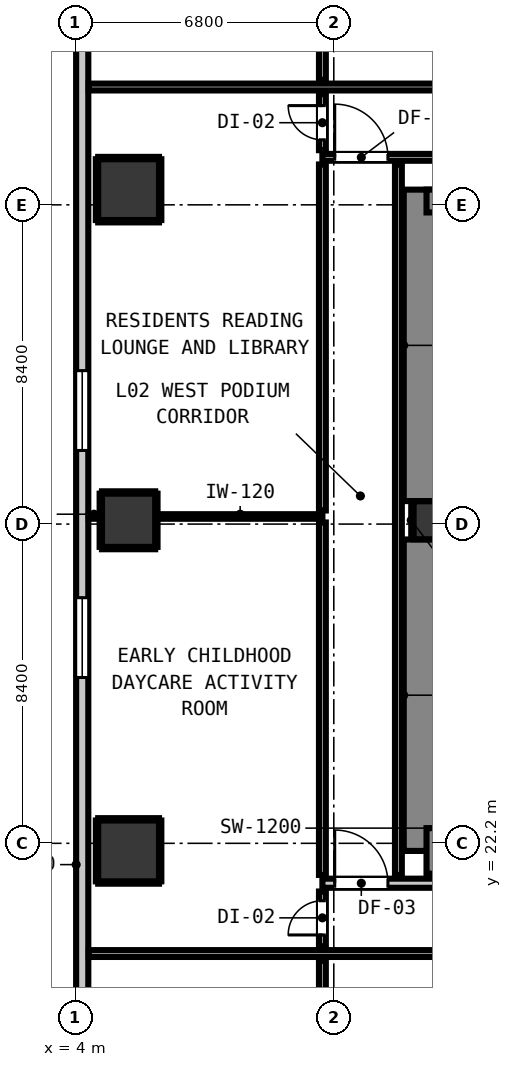
"""IFC4 building model, lengths in metres.
Left out: names, types, materials, properties, quantities, classifications, styles, units other than length and angle.
Written with IfcOpenShell. Run it as: python <this file> out.ifc"""

import sys

from ifc_helpers import new_model, si_unit, direction, frame, frame_2d, origin, origin_2d, place, context, subcontext, project, spatial, rectangle, extrude, element, fill, save


model = new_model("IFC4")
c1 = context("Model", 3, precision=1e-05, world=origin(), true_north=direction((0.0, 1.0)))
c2 = subcontext(c1, "Body", "Model", "MODEL_VIEW")
j1 = project(units=[si_unit("LENGTHUNIT", "METRE"), si_unit("PLANEANGLEUNIT", "RADIAN")], contexts=[c1])
p1 = place(None, origin())
s1 = spatial("IfcSite", under=j1, at=p1, CompositionType="ELEMENT")
p2 = place(p1, origin())
s2 = spatial("IfcBuilding", under=s1, at=p2, CompositionType="ELEMENT")
p3 = place(p2, frame((0.0, 0.0, 9.4)))
s3 = spatial("IfcBuildingStorey", under=s2, at=p3, CompositionType="ELEMENT", Elevation=9.4)
p4 = place(p3, frame((13.4, 30.7, 0.0), z_axis=(0.0, 0.0, 1.0), x_axis=(1.0, 0.0, 0.0)))
e1 = element("IfcColumn", 1, at=p4, inside=s3, PredefinedType="COLUMN", context=c2, shape_type="SweptSolid", body=[
    extrude(rectangle(XDim=1.0, YDim=1.0, at=origin_2d()), origin(), (0.0, 0.0, 1.0), 4.2),
])
p5 = place(p3, frame((13.24, 22.0, 0.0), z_axis=(0.0, 0.0, 1.0), x_axis=(0.0, 1.0, 0.0)))
e2 = element("IfcWall", 2, at=p5, inside=s3, PredefinedType="SHEAR", context=c2, shape_type="SweptSolid", body=[
    extrude(rectangle(XDim=8.195, YDim=1.2, at=frame_2d((4.098, 0.0))), origin(), (0.0, 0.0, 1.0), 4.2),
])
p6 = place(p3, frame((13.24, 31.205, 0.0), z_axis=(0.0, 0.0, 1.0), x_axis=(0.0, 1.0, 0.0)))
e3 = element("IfcWall", 3, at=p6, inside=s3, PredefinedType="SHEAR", context=c2, shape_type="SweptSolid", body=[
    extrude(rectangle(XDim=8.195, YDim=1.2, at=frame_2d((4.097, 0.0))), origin(), (0.0, 0.0, 1.0), 4.2),
])
p7 = place(p3, frame((13.24, 22.0, 0.0), z_axis=(0.0, 0.0, 1.0), x_axis=(1.0, 0.0, 0.0)))
e4 = element("IfcWall", 4, at=p7, inside=s3, PredefinedType="SHEAR", context=c2, shape_type="SweptSolid", body=[
    extrude(rectangle(XDim=4.08, YDim=1.2, at=frame_2d((2.04, 0.0))), origin(), (0.0, 0.0, 1.0), 4.2),
])
p8 = place(p3, frame((13.24, 39.1, 0.0), z_axis=(0.0, 0.0, 1.0), x_axis=(1.0, 0.0, 0.0)))
e5 = element("IfcWall", 5, at=p8, inside=s3, PredefinedType="SHEAR", context=c2, shape_type="SweptSolid", body=[
    extrude(rectangle(XDim=4.08, YDim=0.6, at=frame_2d((2.04, 0.0))), origin(), (0.0, 0.0, 1.0), 4.2),
])
p9 = place(p3, frame((5.4, 22.0, 0.0), z_axis=(0.0, 0.0, 1.0), x_axis=(1.0, 0.0, 0.0)))
e6 = element("IfcColumn", 6, at=p9, inside=s3, PredefinedType="COLUMN", context=c2, shape_type="SweptSolid", body=[
    extrude(rectangle(XDim=1.6, YDim=1.6, at=origin_2d()), origin(), (0.0, 0.0, 1.0), 4.2),
])
p10 = place(p3, frame((5.4, 30.7, 0.0), z_axis=(0.0, 0.0, 1.0), x_axis=(1.0, 0.0, 0.0)))
e7 = element("IfcColumn", 7, at=p10, inside=s3, PredefinedType="COLUMN", context=c2, shape_type="SweptSolid", body=[
    extrude(rectangle(XDim=1.4, YDim=1.4, at=origin_2d()), origin(), (0.0, 0.0, 1.0), 4.2),
])
p11 = place(p3, frame((5.4, 39.4, 0.0), z_axis=(0.0, 0.0, 1.0), x_axis=(1.0, 0.0, 0.0)))
e8 = element("IfcColumn", 8, at=p11, inside=s3, PredefinedType="COLUMN", context=c2, shape_type="SweptSolid", body=[
    extrude(rectangle(XDim=1.6, YDim=1.6, at=origin_2d()), origin(), (0.0, 0.0, 1.0), 4.2),
])
p12 = place(p3, frame((4.18, 12.68, 0.0), z_axis=(0.0, 0.0, 1.0), x_axis=(0.0, 1.0, 0.0)))
e9 = element("IfcWall", 9, at=p12, inside=s3, PredefinedType="STANDARD", context=c2, shape_type="SweptSolid", body=[
    extrude(rectangle(XDim=35.84, YDim=0.32, at=frame_2d((17.92, 0.0))), origin(), (0.0, 0.0, 1.0), 3.92),
])
p13 = place(p12, frame((1.937, 0.0, 0.9)))
e10 = element("IfcOpeningElement", 10, at=p13, cuts=e9, PredefinedType="OPENING", context=c2, shape_type="SweptSolid", body=[
    extrude(rectangle(XDim=2.1, YDim=1.9, at=frame_2d((1.05, 0.95))), frame((0.0, 0.17, 0.0), z_axis=(0.0, -1.0, 0.0), x_axis=(1.0, 0.0, 0.0)), (0.0, 0.0, 1.0), 0.34),
])
p14 = place(p12, frame((13.883, 0.0, 0.9)))
e11 = element("IfcOpeningElement", 11, at=p14, cuts=e9, PredefinedType="OPENING", context=c2, shape_type="SweptSolid", body=[
    extrude(rectangle(XDim=2.1, YDim=1.9, at=frame_2d((1.05, 0.95))), frame((0.0, 0.17, 0.0), z_axis=(0.0, -1.0, 0.0), x_axis=(1.0, 0.0, 0.0)), (0.0, 0.0, 1.0), 0.34),
])
p15 = place(p12, frame((19.857, 0.0, 0.9)))
e12 = element("IfcOpeningElement", 12, at=p15, cuts=e9, PredefinedType="OPENING", context=c2, shape_type="SweptSolid", body=[
    extrude(rectangle(XDim=2.1, YDim=1.9, at=frame_2d((1.05, 0.95))), frame((0.0, 0.17, 0.0), z_axis=(0.0, -1.0, 0.0), x_axis=(1.0, 0.0, 0.0)), (0.0, 0.0, 1.0), 0.34),
])
p16 = place(p12, frame((31.803, 0.0, 0.9)))
e13 = element("IfcOpeningElement", 13, at=p16, cuts=e9, PredefinedType="OPENING", context=c2, shape_type="SweptSolid", body=[
    extrude(rectangle(XDim=2.1, YDim=1.9, at=frame_2d((1.05, 0.95))), frame((0.0, 0.17, 0.0), z_axis=(0.0, -1.0, 0.0), x_axis=(1.0, 0.0, 0.0)), (0.0, 0.0, 1.0), 0.34),
])
p17 = place(p3, frame((10.5, 21.15, 0.0), z_axis=(0.0, 0.0, 1.0), x_axis=(1.0, 0.0, 0.0)))
e14 = element("IfcWall", 14, at=p17, inside=s3, PredefinedType="PARTITIONING", context=c2, shape_type="SweptSolid", body=[
    extrude(rectangle(XDim=28.7, YDim=0.24, at=frame_2d((14.35, 0.0))), origin(), (0.0, 0.0, 1.0), 3.92),
])
p18 = place(p17, frame((7.71, 0.0, 0.0)))
e15 = element("IfcOpeningElement", 15, at=p18, cuts=e14, PredefinedType="OPENING", context=c2, shape_type="SweptSolid", body=[
    extrude(rectangle(XDim=1.1, YDim=2.15, at=frame_2d((0.55, 1.075))), frame((0.0, 0.13, 0.0), z_axis=(0.0, -1.0, 0.0), x_axis=(1.0, 0.0, 0.0)), (0.0, 0.0, 1.0), 0.26),
])
p19 = place(p17, frame((0.324, 0.0, 0.0)))
e16 = element("IfcOpeningElement", 16, at=p19, cuts=e14, PredefinedType="OPENING", context=c2, shape_type="SweptSolid", body=[
    extrude(rectangle(XDim=1.4, YDim=2.15, at=frame_2d((0.7, 1.075))), frame((0.0, 0.13, 0.0), z_axis=(0.0, -1.0, 0.0), x_axis=(1.0, 0.0, 0.0)), (0.0, 0.0, 1.0), 0.26),
])
p20 = place(p17, frame((27.026, 0.0, 0.0)))
e17 = element("IfcOpeningElement", 17, at=p20, cuts=e14, PredefinedType="OPENING", context=c2, shape_type="SweptSolid", body=[
    extrude(rectangle(XDim=1.4, YDim=2.15, at=frame_2d((0.7, 1.075))), frame((0.0, 0.13, 0.0), z_axis=(0.0, -1.0, 0.0), x_axis=(1.0, 0.0, 0.0)), (0.0, 0.0, 1.0), 0.26),
])
p21 = place(p3, frame((4.352, 19.3, 0.0), z_axis=(0.0, 0.0, 1.0), x_axis=(1.0, 0.0, 0.0)))
e18 = element("IfcWall", 18, at=p21, inside=s3, PredefinedType="PARTITIONING", context=c2, shape_type="SweptSolid", body=[
    extrude(rectangle(XDim=43.296, YDim=0.18, at=frame_2d((21.648, 0.0))), origin(), (0.0, 0.0, 1.0), 3.92),
])
p22 = place(p21, frame((12.248, 0.0, 0.0)))
e19 = element("IfcOpeningElement", 19, at=p22, cuts=e18, PredefinedType="OPENING", context=c2, shape_type="SweptSolid", body=[
    extrude(rectangle(XDim=1.0, YDim=2.15, at=frame_2d((0.5, 1.075))), frame((0.0, 0.1, 0.0), z_axis=(0.0, -1.0, 0.0), x_axis=(1.0, 0.0, 0.0)), (0.0, 0.0, 1.0), 0.2),
])
p23 = place(p21, frame((27.998, 0.0, 0.0)))
e20 = element("IfcOpeningElement", 20, at=p23, cuts=e18, PredefinedType="OPENING", context=c2, shape_type="SweptSolid", body=[
    extrude(rectangle(XDim=1.0, YDim=2.15, at=frame_2d((0.5, 1.075))), frame((0.0, 0.1, 0.0), z_axis=(0.0, -1.0, 0.0), x_axis=(1.0, 0.0, 0.0)), (0.0, 0.0, 1.0), 0.2),
])
p24 = place(p3, frame((10.5, 40.25, 0.0), z_axis=(0.0, 0.0, 1.0), x_axis=(1.0, 0.0, 0.0)))
e21 = element("IfcWall", 21, at=p24, inside=s3, PredefinedType="PARTITIONING", context=c2, shape_type="SweptSolid", body=[
    extrude(rectangle(XDim=37.148, YDim=0.18, at=frame_2d((18.574, 0.0))), origin(), (0.0, 0.0, 1.0), 3.92),
])
p25 = place(p24, frame((6.935, 0.0, 0.0)))
e22 = element("IfcOpeningElement", 22, at=p25, cuts=e21, PredefinedType="OPENING", context=c2, shape_type="SweptSolid", body=[
    extrude(rectangle(XDim=1.4, YDim=2.15, at=frame_2d((0.7, 1.075))), frame((0.0, 0.1, 0.0), z_axis=(0.0, -1.0, 0.0), x_axis=(1.0, 0.0, 0.0)), (0.0, 0.0, 1.0), 0.2),
])
p26 = place(p24, frame((0.324, 0.0, 0.0)))
e23 = element("IfcOpeningElement", 23, at=p26, cuts=e21, PredefinedType="OPENING", context=c2, shape_type="SweptSolid", body=[
    extrude(rectangle(XDim=1.4, YDim=2.15, at=frame_2d((0.7, 1.075))), frame((0.0, 0.1, 0.0), z_axis=(0.0, -1.0, 0.0), x_axis=(1.0, 0.0, 0.0)), (0.0, 0.0, 1.0), 0.2),
])
p27 = place(p24, frame((27.05, 0.0, 0.0)))
e24 = element("IfcOpeningElement", 24, at=p27, cuts=e21, PredefinedType="OPENING", context=c2, shape_type="SweptSolid", body=[
    extrude(rectangle(XDim=1.4, YDim=2.15, at=frame_2d((0.7, 1.075))), frame((0.0, 0.1, 0.0), z_axis=(0.0, -1.0, 0.0), x_axis=(1.0, 0.0, 0.0)), (0.0, 0.0, 1.0), 0.2),
])
p28 = place(p3, frame((4.352, 42.1, 0.0), z_axis=(0.0, 0.0, 1.0), x_axis=(1.0, 0.0, 0.0)))
e25 = element("IfcWall", 25, at=p28, inside=s3, PredefinedType="PARTITIONING", context=c2, shape_type="SweptSolid", body=[
    extrude(rectangle(XDim=43.296, YDim=0.18, at=frame_2d((21.648, 0.0))), origin(), (0.0, 0.0, 1.0), 3.92),
])
p29 = place(p28, frame((14.472, 0.0, 0.0)))
e26 = element("IfcOpeningElement", 26, at=p29, cuts=e25, PredefinedType="OPENING", context=c2, shape_type="SweptSolid", body=[
    extrude(rectangle(XDim=0.9, YDim=2.1, at=frame_2d((0.45, 1.05))), frame((0.0, 0.1, 0.0), z_axis=(0.0, -1.0, 0.0), x_axis=(1.0, 0.0, 0.0)), (0.0, 0.0, 1.0), 0.2),
])
p30 = place(p28, frame((25.118, 0.0, 0.0)))
e27 = element("IfcOpeningElement", 27, at=p30, cuts=e25, PredefinedType="OPENING", context=c2, shape_type="SweptSolid", body=[
    extrude(rectangle(XDim=0.86, YDim=2.02, at=frame_2d((0.43, 1.01))), frame((0.0, 0.1, 0.0), z_axis=(0.0, -1.0, 0.0), x_axis=(1.0, 0.0, 0.0)), (0.0, 0.0, 1.0), 0.2),
])
p31 = place(p28, frame((29.218, 0.0, 0.0)))
e28 = element("IfcOpeningElement", 28, at=p31, cuts=e25, PredefinedType="OPENING", context=c2, shape_type="SweptSolid", body=[
    extrude(rectangle(XDim=0.86, YDim=2.02, at=frame_2d((0.43, 1.01))), frame((0.0, 0.1, 0.0), z_axis=(0.0, -1.0, 0.0), x_axis=(1.0, 0.0, 0.0)), (0.0, 0.0, 1.0), 0.2),
])
p32 = place(p28, frame((32.873, 0.0, 0.0)))
e29 = element("IfcOpeningElement", 29, at=p32, cuts=e25, PredefinedType="OPENING", context=c2, shape_type="SweptSolid", body=[
    extrude(rectangle(XDim=0.95, YDim=2.1, at=frame_2d((0.475, 1.05))), frame((0.0, 0.1, 0.0), z_axis=(0.0, -1.0, 0.0), x_axis=(1.0, 0.0, 0.0)), (0.0, 0.0, 1.0), 0.2),
])
p33 = place(p28, frame((35.688, 0.0, 0.0)))
e30 = element("IfcOpeningElement", 30, at=p33, cuts=e25, PredefinedType="OPENING", context=c2, shape_type="SweptSolid", body=[
    extrude(rectangle(XDim=0.9, YDim=2.1, at=frame_2d((0.45, 1.05))), frame((0.0, 0.1, 0.0), z_axis=(0.0, -1.0, 0.0), x_axis=(1.0, 0.0, 0.0)), (0.0, 0.0, 1.0), 0.2),
])
p34 = place(p3, frame((4.352, 30.8, 0.0), z_axis=(0.0, 0.0, 1.0), x_axis=(1.0, 0.0, 0.0)))
e31 = element("IfcWall", 31, at=p34, inside=s3, PredefinedType="PARTITIONING", context=c2, shape_type="SweptSolid", body=[
    extrude(rectangle(XDim=0.276, YDim=0.12, at=frame_2d((0.138, 0.0))), origin(), (0.0, 0.0, 1.0), 3.92),
])
p35 = place(p3, frame((6.172, 30.8, 0.0), z_axis=(0.0, 0.0, 1.0), x_axis=(1.0, 0.0, 0.0)))
e32 = element("IfcWall", 32, at=p35, inside=s3, PredefinedType="PARTITIONING", context=c2, shape_type="SweptSolid", body=[
    extrude(rectangle(XDim=4.328, YDim=0.12, at=frame_2d((2.164, 0.0))), origin(), (0.0, 0.0, 1.0), 3.155),
])
p36 = place(p3, frame((10.5, 16.372, 0.0), z_axis=(0.0, 0.0, 1.0), x_axis=(0.0, 1.0, 0.0)))
e33 = element("IfcWall", 33, at=p36, inside=s3, PredefinedType="PARTITIONING", context=c2, shape_type="SweptSolid", body=[
    extrude(rectangle(XDim=2.74, YDim=0.18, at=frame_2d((1.37, 0.0))), origin(), (0.0, 0.0, 1.0), 3.92),
])
p37 = place(p3, frame((10.5, 19.488, 0.0), z_axis=(0.0, 0.0, 1.0), x_axis=(0.0, 1.0, 0.0)))
e34 = element("IfcWall", 34, at=p37, inside=s3, PredefinedType="PARTITIONING", context=c2, shape_type="SweptSolid", body=[
    extrude(rectangle(XDim=1.444, YDim=0.18, at=frame_2d((0.722, 0.0))), origin(), (0.0, 0.0, 1.0), 3.92),
])
p38 = place(p37, frame((0.301, 0.0, 0.0)))
e35 = element("IfcOpeningElement", 35, at=p38, cuts=e34, PredefinedType="OPENING", context=c2, shape_type="SweptSolid", body=[
    extrude(rectangle(XDim=0.9, YDim=2.1, at=frame_2d((0.45, 1.05))), frame((0.0, 0.1, 0.0), z_axis=(0.0, -1.0, 0.0), x_axis=(1.0, 0.0, 0.0)), (0.0, 0.0, 1.0), 0.2),
])
p39 = place(p3, frame((10.5, 21.368, 0.0), z_axis=(0.0, 0.0, 1.0), x_axis=(0.0, 1.0, 0.0)))
e36 = element("IfcWall", 36, at=p39, inside=s3, PredefinedType="PARTITIONING", context=c2, shape_type="SweptSolid", body=[
    extrude(rectangle(XDim=9.274, YDim=0.18, at=frame_2d((4.637, 0.0))), origin(), (0.0, 0.0, 1.0), 3.92),
])
p40 = place(p3, frame((10.5, 30.958, 0.0), z_axis=(0.0, 0.0, 1.0), x_axis=(0.0, 1.0, 0.0)))
e37 = element("IfcWall", 37, at=p40, inside=s3, PredefinedType="PARTITIONING", context=c2, shape_type="SweptSolid", body=[
    extrude(rectangle(XDim=9.104, YDim=0.18, at=frame_2d((4.552, 0.0))), origin(), (0.0, 0.0, 1.0), 3.92),
])
p41 = place(p3, frame((10.5, 40.438, 0.0), z_axis=(0.0, 0.0, 1.0), x_axis=(0.0, 1.0, 0.0)))
e38 = element("IfcWall", 38, at=p41, inside=s3, PredefinedType="PARTITIONING", context=c2, shape_type="SweptSolid", body=[
    extrude(rectangle(XDim=1.474, YDim=0.18, at=frame_2d((0.737, 0.0))), origin(), (0.0, 0.0, 1.0), 3.92),
])
p42 = place(p41, frame((0.273, 0.0, 0.0)))
e39 = element("IfcOpeningElement", 39, at=p42, cuts=e38, PredefinedType="OPENING", context=c2, shape_type="SweptSolid", body=[
    extrude(rectangle(XDim=0.9, YDim=2.1, at=frame_2d((0.45, 1.05))), frame((0.0, 0.1, 0.0), z_axis=(0.0, -1.0, 0.0), x_axis=(1.0, 0.0, 0.0)), (0.0, 0.0, 1.0), 0.2),
])
p43 = place(p3, frame((10.5, 42.288, 0.0), z_axis=(0.0, 0.0, 1.0), x_axis=(0.0, 1.0, 0.0)))
e40 = element("IfcWall", 40, at=p43, inside=s3, PredefinedType="PARTITIONING", context=c2, shape_type="SweptSolid", body=[
    extrude(rectangle(XDim=8.56, YDim=0.18, at=frame_2d((4.28, 0.0))), origin(), (0.0, 0.0, 1.0), 3.92),
])
p44 = place(p3, frame((12.5, 21.368, 0.0), z_axis=(0.0, 0.0, 1.0), x_axis=(0.0, 1.0, 0.0)))
e41 = element("IfcWall", 41, at=p44, inside=s3, PredefinedType="PARTITIONING", context=c2, shape_type="SweptSolid", body=[
    extrude(rectangle(XDim=18.694, YDim=0.18, at=frame_2d((9.347, 0.0))), origin(), (0.0, 0.0, 1.0), 3.92),
])
p45 = place(p3, frame((12.868, 30.21, 0.0), z_axis=(0.0, 0.0, 1.0), x_axis=(0.0, 1.0, 0.0)))
e42 = element("IfcWall", 42, at=p45, inside=s3, PredefinedType="PARTITIONING", context=c2, shape_type="SweptSolid", body=[
    extrude(rectangle(XDim=0.98, YDim=0.06, at=frame_2d((0.49, 0.0))), origin(), (0.0, 0.0, 1.0), 1.45),
])
for number, where, z_axis, x_axis in (
    (43, (4.6, 21.168, 0.0), (0.0, 0.0, 1.0), (1.0, 0.0, 0.0)),
    (44, (4.6, 22.832, 0.0), (0.0, 0.0, 1.0), (1.0, 0.0, 0.0)),
):
    element("IfcWall", number, at=place(p3, frame(where, z_axis=z_axis, x_axis=x_axis)), inside=s3, PredefinedType="PARTITIONING", context=c2, shape_type="SweptSolid", body=[
        extrude(rectangle(XDim=1.6, YDim=0.06, at=frame_2d((0.8, 0.0))), origin(), (0.0, 0.0, 1.0), 1.45),
    ])
for number, where, z_axis, x_axis in (
    (45, (4.568, 21.2, 0.0), (0.0, 0.0, 1.0), (0.0, 1.0, 0.0)),
    (46, (6.232, 21.2, 0.0), (0.0, 0.0, 1.0), (0.0, 1.0, 0.0)),
):
    element("IfcWall", number, at=place(p3, frame(where, z_axis=z_axis, x_axis=x_axis)), inside=s3, PredefinedType="PARTITIONING", context=c2, shape_type="SweptSolid", body=[
        extrude(rectangle(XDim=1.6, YDim=0.06, at=frame_2d((0.8, 0.0))), origin(), (0.0, 0.0, 1.0), 1.45),
    ])
for number, where, z_axis, x_axis in (
    (47, (4.7, 29.968, 0.0), (0.0, 0.0, 1.0), (1.0, 0.0, 0.0)),
    (48, (4.7, 31.432, 0.0), (0.0, 0.0, 1.0), (1.0, 0.0, 0.0)),
):
    element("IfcWall", number, at=place(p3, frame(where, z_axis=z_axis, x_axis=x_axis)), inside=s3, PredefinedType="PARTITIONING", context=c2, shape_type="SweptSolid", body=[
        extrude(rectangle(XDim=1.4, YDim=0.06, at=frame_2d((0.7, 0.0))), origin(), (0.0, 0.0, 1.0), 1.45),
    ])
for number, where, z_axis, x_axis in (
    (49, (4.668, 30.0, 0.0), (0.0, 0.0, 1.0), (0.0, 1.0, 0.0)),
    (50, (6.132, 30.0, 0.0), (0.0, 0.0, 1.0), (0.0, 1.0, 0.0)),
):
    element("IfcWall", number, at=place(p3, frame(where, z_axis=z_axis, x_axis=x_axis)), inside=s3, PredefinedType="PARTITIONING", context=c2, shape_type="SweptSolid", body=[
        extrude(rectangle(XDim=1.4, YDim=0.06, at=frame_2d((0.7, 0.0))), origin(), (0.0, 0.0, 1.0), 1.45),
    ])
for number, where, z_axis, x_axis in (
    (51, (4.6, 38.568, 0.0), (0.0, 0.0, 1.0), (1.0, 0.0, 0.0)),
    (52, (4.6, 40.232, 0.0), (0.0, 0.0, 1.0), (1.0, 0.0, 0.0)),
    (53, (4.568, 38.6, 0.0), (0.0, 0.0, 1.0), (0.0, 1.0, 0.0)),
    (54, (6.232, 38.6, 0.0), (0.0, 0.0, 1.0), (0.0, 1.0, 0.0)),
):
    element("IfcWall", number, at=place(p3, frame(where, z_axis=z_axis, x_axis=x_axis)), inside=s3, PredefinedType="PARTITIONING", context=c2, shape_type="SweptSolid", body=[
        extrude(rectangle(XDim=1.6, YDim=0.06, at=frame_2d((0.8, 0.0))), origin(), (0.0, 0.0, 1.0), 1.45),
    ])
p46 = place(p14, origin())
e55 = element("IfcWindow", 55, at=p46, inside=s3, PartitioningType="SINGLE_PANEL", PredefinedType="WINDOW", context=c2, shape_type="SweptSolid", body=[
    extrude(rectangle(XDim=2.1, YDim=1.9, at=frame_2d((1.05, 0.95))), frame((0.0, 0.03, 0.0), z_axis=(0.0, -1.0, 0.0), x_axis=(1.0, 0.0, 0.0)), (0.0, 0.0, 1.0), 0.06),
])
fill(e11, e55)
p47 = place(p15, origin())
e56 = element("IfcWindow", 56, at=p47, inside=s3, PartitioningType="SINGLE_PANEL", PredefinedType="WINDOW", context=c2, shape_type="SweptSolid", body=[
    extrude(rectangle(XDim=2.1, YDim=1.9, at=frame_2d((1.05, 0.95))), frame((0.0, 0.03, 0.0), z_axis=(0.0, -1.0, 0.0), x_axis=(1.0, 0.0, 0.0)), (0.0, 0.0, 1.0), 0.06),
])
fill(e12, e56)
p48 = place(p19, origin())
e57 = element("IfcDoor", 57, at=p48, inside=s3, OperationType="SINGLE_SWING_LEFT", PredefinedType="DOOR", context=c2, shape_type="SweptSolid", body=[
    extrude(rectangle(XDim=1.4, YDim=2.15, at=frame_2d((0.7, 1.075))), frame((0.0, 0.025, 0.0), z_axis=(0.0, -1.0, 0.0), x_axis=(1.0, 0.0, 0.0)), (0.0, 0.0, 1.0), 0.05),
])
fill(e16, e57)
p49 = place(p26, origin())
e58 = element("IfcDoor", 58, at=p49, inside=s3, OperationType="SINGLE_SWING_LEFT", PredefinedType="DOOR", context=c2, shape_type="SweptSolid", body=[
    extrude(rectangle(XDim=1.4, YDim=2.15, at=frame_2d((0.7, 1.075))), frame((0.0, 0.025, 0.0), z_axis=(0.0, -1.0, 0.0), x_axis=(1.0, 0.0, 0.0)), (0.0, 0.0, 1.0), 0.05),
])
fill(e23, e58)
p50 = place(p38, origin())
e59 = element("IfcDoor", 59, at=p50, inside=s3, OperationType="SINGLE_SWING_LEFT", PredefinedType="DOOR", context=c2, shape_type="SweptSolid", body=[
    extrude(rectangle(XDim=0.9, YDim=2.1, at=frame_2d((0.45, 1.05))), frame((0.0, 0.025, 0.0), z_axis=(0.0, -1.0, 0.0), x_axis=(1.0, 0.0, 0.0)), (0.0, 0.0, 1.0), 0.05),
])
fill(e35, e59)
p51 = place(p42, origin())
e60 = element("IfcDoor", 60, at=p51, inside=s3, OperationType="SINGLE_SWING_RIGHT", PredefinedType="DOOR", context=c2, shape_type="SweptSolid", body=[
    extrude(rectangle(XDim=0.9, YDim=2.1, at=frame_2d((0.45, 1.05))), frame((0.0, 0.025, 0.0), z_axis=(0.0, -1.0, 0.0), x_axis=(1.0, 0.0, 0.0)), (0.0, 0.0, 1.0), 0.05),
])
fill(e39, e60)
save(model, sys.argv[1])
